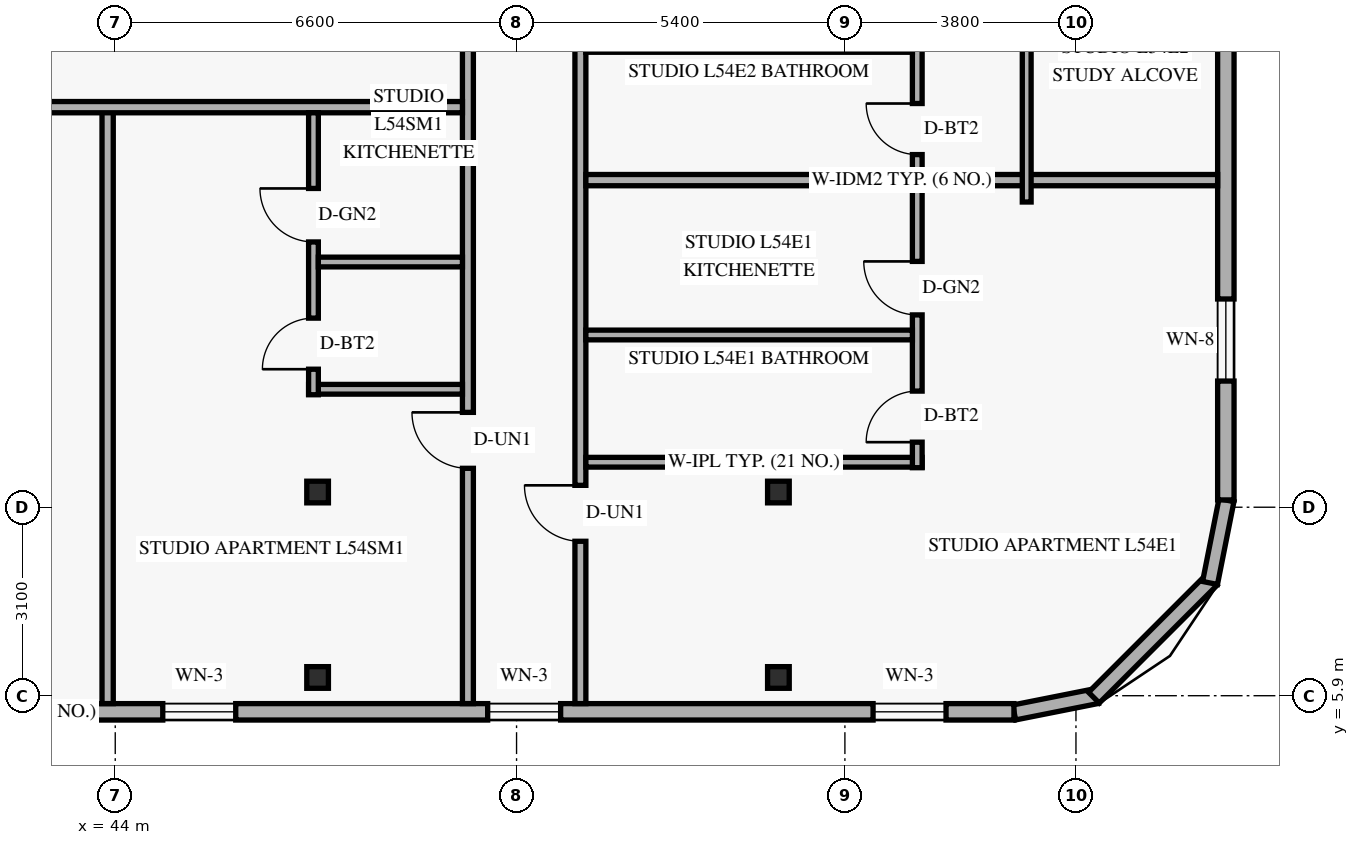
"""IFC4 building model, lengths in metres.
Left out: names, types, materials, properties, quantities, classifications, styles, units other than length and angle.
Written with IfcOpenShell. Run it as: python <this file> out.ifc"""

import sys

from ifc_helpers import new_model, si_unit, direction, frame, frame_2d, origin, origin_2d, place, context, subcontext, project, spatial, rectangle, hollow_rectangle, extrude, element, fill, save


model = new_model("IFC4")
c1 = context("Model", 3, precision=1e-05, world=origin(), true_north=direction((0.0, 1.0)))
c2 = subcontext(c1, "Body", "Model", "MODEL_VIEW")
j1 = project(units=[si_unit("LENGTHUNIT", "METRE"), si_unit("PLANEANGLEUNIT", "RADIAN")], contexts=[c1])
p1 = place(None, origin())
s1 = spatial("IfcSite", under=j1, at=p1, CompositionType="ELEMENT")
p2 = place(p1, origin())
s2 = spatial("IfcBuilding", under=s1, at=p2, CompositionType="ELEMENT")
p3 = place(p2, frame((0.0, 0.0, 209.4)))
s3 = spatial("IfcBuildingStorey", under=s2, at=p3, CompositionType="ELEMENT", Elevation=209.4)
for number, where, z_axis, x_axis in (
    (1, (47.265, 6.2, 0.0), (0.035, 0.0, 0.999), (0.0, 1.0, 0.0)),
    (2, (47.265, 9.25, 0.0), (0.035, 0.0, 0.999), (0.0, 1.0, 0.0)),
):
    element("IfcColumn", number, at=place(p3, frame(where, z_axis=z_axis, x_axis=x_axis)), inside=s3, PredefinedType="COLUMN", context=c2, shape_type="SweptSolid", body=[
        extrude(hollow_rectangle(XDim=0.356, YDim=0.356, WallThickness=0.016, at=origin_2d()), origin(), (0.0, 0.0, 1.0), 3.602),
    ])
for number, where, z_axis, x_axis in (
    (3, (54.802, 6.2, 0.0), (0.058, 0.0, 0.998), (0.0, 1.0, 0.0)),
    (4, (54.802, 9.25, 0.0), (0.058, 0.0, 0.998), (0.0, 1.0, 0.0)),
):
    element("IfcColumn", number, at=place(p3, frame(where, z_axis=z_axis, x_axis=x_axis)), inside=s3, PredefinedType="COLUMN", context=c2, shape_type="SweptSolid", body=[
        extrude(hollow_rectangle(XDim=0.356, YDim=0.356, WallThickness=0.016, at=origin_2d()), origin(), (0.0, 0.0, 1.0), 3.606),
    ])
p4 = place(p3, frame((58.783, 5.624, 0.0), z_axis=(0.0, 0.0, 1.0), x_axis=(0.980809899341, 0.19496651342, 0.0)))
e5 = element("IfcWall", 5, at=p4, inside=s3, PredefinedType="SOLIDWALL", context=c2, shape_type="SweptSolid", body=[
    extrude(rectangle(XDim=1.389, YDim=0.25, at=frame_2d((0.694, 0.0))), origin(), (0.0, 0.0, 1.0), 3.36),
])
p5 = place(p3, frame((60.095, 5.868, 0.0), z_axis=(0.0, 0.0, 1.0), x_axis=(0.707106781187, 0.707106781187, 0.0)))
e6 = element("IfcWall", 6, at=p5, inside=s3, PredefinedType="SOLIDWALL", context=c2, shape_type="SweptSolid", body=[
    extrude(rectangle(XDim=2.739, YDim=0.25, at=frame_2d((1.37, 0.0))), origin(), (0.0, 0.0, 1.0), 3.36),
])
p6 = place(p3, frame((62.005, 7.754, 0.0), z_axis=(0.0, 0.0, 1.0), x_axis=(0.195135625965, 0.9807762678, 0.0)))
e7 = element("IfcWall", 7, at=p6, inside=s3, PredefinedType="SOLIDWALL", context=c2, shape_type="SweptSolid", body=[
    extrude(rectangle(XDim=1.389, YDim=0.25, at=frame_2d((0.694, 0.0))), origin(), (0.0, 0.0, 1.0), 3.36),
])
p7 = place(p3, frame((25.82, 5.635, 0.0), z_axis=(0.0, 0.0, 1.0), x_axis=(1.0, 0.0, 0.0)))
e8 = element("IfcWall", 8, at=p7, inside=s3, PredefinedType="SOLIDWALL", context=c2, shape_type="SweptSolid", body=[
    extrude(rectangle(XDim=32.96, YDim=0.27, at=frame_2d((16.48, 0.0))), origin(), (0.0, 0.0, 1.0), 3.36),
])
p8 = place(p7, frame((3.87, 0.0, 0.85)))
e9 = element("IfcOpeningElement", 9, at=p8, cuts=e8, PredefinedType="OPENING", context=c2, shape_type="SweptSolid", body=[
    extrude(rectangle(XDim=1.2, YDim=1.5, at=frame_2d((0.6, 0.75))), frame((0.0, 0.145, 0.0), z_axis=(0.0, -1.0, 0.0), x_axis=(1.0, 0.0, 0.0)), (0.0, 0.0, 1.0), 0.29),
])
p9 = place(p7, frame((18.961, 0.0, 0.85)))
e10 = element("IfcOpeningElement", 10, at=p9, cuts=e8, PredefinedType="OPENING", context=c2, shape_type="SweptSolid", body=[
    extrude(rectangle(XDim=1.2, YDim=1.5, at=frame_2d((0.6, 0.75))), frame((0.0, 0.145, 0.0), z_axis=(0.0, -1.0, 0.0), x_axis=(1.0, 0.0, 0.0)), (0.0, 0.0, 1.0), 0.29),
])
p10 = place(p7, frame((24.305, 0.0, 0.85)))
e11 = element("IfcOpeningElement", 11, at=p10, cuts=e8, PredefinedType="OPENING", context=c2, shape_type="SweptSolid", body=[
    extrude(rectangle(XDim=1.2, YDim=1.5, at=frame_2d((0.6, 0.75))), frame((0.0, 0.145, 0.0), z_axis=(0.0, -1.0, 0.0), x_axis=(1.0, 0.0, 0.0)), (0.0, 0.0, 1.0), 0.29),
])
p11 = place(p7, frame((30.643, 0.0, 0.85)))
e12 = element("IfcOpeningElement", 12, at=p11, cuts=e8, PredefinedType="OPENING", context=c2, shape_type="SweptSolid", body=[
    extrude(rectangle(XDim=1.2, YDim=1.5, at=frame_2d((0.6, 0.75))), frame((0.0, 0.145, 0.0), z_axis=(0.0, -1.0, 0.0), x_axis=(1.0, 0.0, 0.0)), (0.0, 0.0, 1.0), 0.29),
])
p12 = place(p3, frame((62.265, 9.12, 0.0), z_axis=(0.0, 0.0, 1.0), x_axis=(0.0, 1.0, 0.0)))
e13 = element("IfcWall", 13, at=p12, inside=s3, PredefinedType="SOLIDWALL", context=c2, shape_type="SweptSolid", body=[
    extrude(rectangle(XDim=29.76, YDim=0.27, at=frame_2d((14.88, 0.0))), origin(), (0.0, 0.0, 1.0), 3.36),
])
p13 = place(p12, frame((1.955, 0.0, 0.85)))
e14 = element("IfcOpeningElement", 14, at=p13, cuts=e13, PredefinedType="OPENING", context=c2, shape_type="SweptSolid", body=[
    extrude(rectangle(XDim=1.35, YDim=1.55, at=frame_2d((0.675, 0.775))), frame((0.0, 0.145, 0.0), z_axis=(0.0, -1.0, 0.0), x_axis=(1.0, 0.0, 0.0)), (0.0, 0.0, 1.0), 0.29),
])
p14 = place(p12, frame((7.53, 0.0, 0.85)))
e15 = element("IfcOpeningElement", 15, at=p14, cuts=e13, PredefinedType="OPENING", context=c2, shape_type="SweptSolid", body=[
    extrude(rectangle(XDim=1.35, YDim=1.55, at=frame_2d((0.675, 0.775))), frame((0.0, 0.145, 0.0), z_axis=(0.0, -1.0, 0.0), x_axis=(1.0, 0.0, 0.0)), (0.0, 0.0, 1.0), 0.29),
])
p15 = place(p12, frame((12.34, 0.0, 0.85)))
e16 = element("IfcOpeningElement", 16, at=p15, cuts=e13, PredefinedType="OPENING", context=c2, shape_type="SweptSolid", body=[
    extrude(rectangle(XDim=1.35, YDim=1.55, at=frame_2d((0.675, 0.775))), frame((0.0, 0.145, 0.0), z_axis=(0.0, -1.0, 0.0), x_axis=(1.0, 0.0, 0.0)), (0.0, 0.0, 1.0), 0.29),
])
p16 = place(p12, frame((17.412, 0.0, 0.85)))
e17 = element("IfcOpeningElement", 17, at=p16, cuts=e13, PredefinedType="OPENING", context=c2, shape_type="SweptSolid", body=[
    extrude(rectangle(XDim=1.35, YDim=1.55, at=frame_2d((0.675, 0.775))), frame((0.0, 0.145, 0.0), z_axis=(0.0, -1.0, 0.0), x_axis=(1.0, 0.0, 0.0)), (0.0, 0.0, 1.0), 0.29),
])
p17 = place(p12, frame((22.222, 0.0, 0.85)))
e18 = element("IfcOpeningElement", 18, at=p17, cuts=e13, PredefinedType="OPENING", context=c2, shape_type="SweptSolid", body=[
    extrude(rectangle(XDim=1.35, YDim=1.55, at=frame_2d((0.675, 0.775))), frame((0.0, 0.145, 0.0), z_axis=(0.0, -1.0, 0.0), x_axis=(1.0, 0.0, 0.0)), (0.0, 0.0, 1.0), 0.29),
])
p18 = place(p12, frame((26.455, 0.0, 0.85)))
e19 = element("IfcOpeningElement", 19, at=p18, cuts=e13, PredefinedType="OPENING", context=c2, shape_type="SweptSolid", body=[
    extrude(rectangle(XDim=1.35, YDim=1.55, at=frame_2d((0.675, 0.775))), frame((0.0, 0.145, 0.0), z_axis=(0.0, -1.0, 0.0), x_axis=(1.0, 0.0, 0.0)), (0.0, 0.0, 1.0), 0.29),
])
p19 = place(p3, frame((49.8, 5.77, 0.0), z_axis=(0.0, 0.0, 1.0), x_axis=(0.0, 1.0, 0.0)))
e20 = element("IfcWall", 20, at=p19, inside=s3, PredefinedType="STANDARD", context=c2, shape_type="SweptSolid", body=[
    extrude(rectangle(XDim=12.83, YDim=0.18, at=frame_2d((6.415, 0.0))), origin(), (0.0, 0.0, 1.0), 2.803),
])
p20 = place(p19, frame((3.87, 0.0, 0.0)))
e21 = element("IfcOpeningElement", 21, at=p20, cuts=e20, PredefinedType="OPENING", context=c2, shape_type="SweptSolid", body=[
    extrude(rectangle(XDim=0.92, YDim=2.15, at=frame_2d((0.46, 1.075))), frame((0.0, 0.1, 0.0), z_axis=(0.0, -1.0, 0.0), x_axis=(1.0, 0.0, 0.0)), (0.0, 0.0, 1.0), 0.2),
])
p21 = place(p3, frame((51.65, 5.77, 0.0), z_axis=(0.0, 0.0, 1.0), x_axis=(0.0, 1.0, 0.0)))
e22 = element("IfcWall", 22, at=p21, inside=s3, PredefinedType="STANDARD", context=c2, shape_type="SweptSolid", body=[
    extrude(rectangle(XDim=36.46, YDim=0.18, at=frame_2d((18.23, 0.0))), origin(), (0.0, 0.0, 1.0), 2.803),
])
p22 = place(p21, frame((2.67, 0.0, 0.0)))
e23 = element("IfcOpeningElement", 23, at=p22, cuts=e22, PredefinedType="OPENING", context=c2, shape_type="SweptSolid", body=[
    extrude(rectangle(XDim=0.92, YDim=2.15, at=frame_2d((0.46, 1.075))), frame((0.0, 0.1, 0.0), z_axis=(0.0, -1.0, 0.0), x_axis=(1.0, 0.0, 0.0)), (0.0, 0.0, 1.0), 0.2),
])
p23 = place(p21, frame((13.61, 0.0, 0.0)))
e24 = element("IfcOpeningElement", 24, at=p23, cuts=e22, PredefinedType="OPENING", context=c2, shape_type="SweptSolid", body=[
    extrude(rectangle(XDim=0.92, YDim=2.15, at=frame_2d((0.46, 1.075))), frame((0.0, 0.1, 0.0), z_axis=(0.0, -1.0, 0.0), x_axis=(1.0, 0.0, 0.0)), (0.0, 0.0, 1.0), 0.2),
])
p24 = place(p21, frame((18.76, 0.0, 0.0)))
e25 = element("IfcOpeningElement", 25, at=p24, cuts=e22, PredefinedType="OPENING", context=c2, shape_type="SweptSolid", body=[
    extrude(rectangle(XDim=0.92, YDim=2.15, at=frame_2d((0.46, 1.075))), frame((0.0, 0.1, 0.0), z_axis=(0.0, -1.0, 0.0), x_axis=(1.0, 0.0, 0.0)), (0.0, 0.0, 1.0), 0.2),
])
p25 = place(p21, frame((32.75, 0.0, 0.0)))
e26 = element("IfcOpeningElement", 26, at=p25, cuts=e22, PredefinedType="OPENING", context=c2, shape_type="SweptSolid", body=[
    extrude(rectangle(XDim=0.92, YDim=2.15, at=frame_2d((0.46, 1.075))), frame((0.0, 0.1, 0.0), z_axis=(0.0, -1.0, 0.0), x_axis=(1.0, 0.0, 0.0)), (0.0, 0.0, 1.0), 0.2),
])
p26 = place(p3, frame((51.74, 9.74, 0.0), z_axis=(0.0, 0.0, 1.0), x_axis=(1.0, 0.0, 0.0)))
e27 = element("IfcWall", 27, at=p26, inside=s3, PredefinedType="PLUMBINGWALL", context=c2, shape_type="SweptSolid", body=[
    extrude(rectangle(XDim=5.53, YDim=0.16, at=frame_2d((2.765, 0.0))), origin(), (0.0, 0.0, 1.0), 2.879),
])
p27 = place(p3, frame((57.19, 9.65, 0.0), z_axis=(0.0, 0.0, 1.0), x_axis=(0.0, 1.0, 0.0)))
e28 = element("IfcWall", 28, at=p27, inside=s3, PredefinedType="PLUMBINGWALL", context=c2, shape_type="SweptSolid", body=[
    extrude(rectangle(XDim=4.73, YDim=0.16, at=frame_2d((2.365, 0.0))), origin(), (0.0, 0.0, 1.0), 3.36),
])
p28 = place(p27, frame((0.42, 0.0, 0.0)))
e29 = element("IfcOpeningElement", 29, at=p28, cuts=e28, PredefinedType="OPENING", context=c2, shape_type="SweptSolid", body=[
    extrude(rectangle(XDim=0.84, YDim=2.12, at=frame_2d((0.42, 1.06))), frame((0.0, 0.09, 0.0), z_axis=(0.0, -1.0, 0.0), x_axis=(1.0, 0.0, 0.0)), (0.0, 0.0, 1.0), 0.18),
])
p29 = place(p27, frame((2.513, 0.0, 0.0)))
e30 = element("IfcOpeningElement", 30, at=p29, cuts=e28, PredefinedType="OPENING", context=c2, shape_type="SweptSolid", body=[
    extrude(rectangle(XDim=0.88, YDim=2.12, at=frame_2d((0.44, 1.06))), frame((0.0, 0.09, 0.0), z_axis=(0.0, -1.0, 0.0), x_axis=(1.0, 0.0, 0.0)), (0.0, 0.0, 1.0), 0.18),
])
p30 = place(p3, frame((51.74, 11.833, 0.0), z_axis=(0.0, 0.0, 1.0), x_axis=(1.0, 0.0, 0.0)))
e31 = element("IfcWall", 31, at=p30, inside=s3, PredefinedType="PLUMBINGWALL", context=c2, shape_type="SweptSolid", body=[
    extrude(rectangle(XDim=5.37, YDim=0.16, at=frame_2d((2.685, 0.0))), origin(), (0.0, 0.0, 1.0), 2.879),
])
p31 = place(p3, frame((51.74, 14.38, 0.0), z_axis=(0.0, 0.0, 1.0), x_axis=(1.0, 0.0, 0.0)))
e32 = element("IfcWall", 32, at=p31, inside=s3, PredefinedType="PARTITIONING", context=c2, shape_type="SweptSolid", body=[
    extrude(rectangle(XDim=10.39, YDim=0.185, at=frame_2d((5.195, 0.0))), origin(), (0.0, 0.0, 1.0), 2.879),
])
p32 = place(p3, frame((57.19, 14.472, 0.0), z_axis=(0.0, 0.0, 1.0), x_axis=(0.0, 1.0, 0.0)))
e33 = element("IfcWall", 33, at=p32, inside=s3, PredefinedType="PLUMBINGWALL", context=c2, shape_type="SweptSolid", body=[
    extrude(rectangle(XDim=4.638, YDim=0.16, at=frame_2d((2.319, 0.0))), origin(), (0.0, 0.0, 1.0), 3.36),
])
p33 = place(p32, frame((0.327, 0.0, 0.0)))
e34 = element("IfcOpeningElement", 34, at=p33, cuts=e33, PredefinedType="OPENING", context=c2, shape_type="SweptSolid", body=[
    extrude(rectangle(XDim=0.84, YDim=2.12, at=frame_2d((0.42, 1.06))), frame((0.0, 0.09, 0.0), z_axis=(0.0, -1.0, 0.0), x_axis=(1.0, 0.0, 0.0)), (0.0, 0.0, 1.0), 0.18),
])
p34 = place(p32, frame((2.42, 0.0, 0.0)))
e35 = element("IfcOpeningElement", 35, at=p34, cuts=e33, PredefinedType="OPENING", context=c2, shape_type="SweptSolid", body=[
    extrude(rectangle(XDim=0.88, YDim=2.12, at=frame_2d((0.44, 1.06))), frame((0.0, 0.09, 0.0), z_axis=(0.0, -1.0, 0.0), x_axis=(1.0, 0.0, 0.0)), (0.0, 0.0, 1.0), 0.18),
])
p35 = place(p3, frame((51.74, 16.563, 0.0), z_axis=(0.0, 0.0, 1.0), x_axis=(1.0, 0.0, 0.0)))
e36 = element("IfcWall", 36, at=p35, inside=s3, PredefinedType="PLUMBINGWALL", context=c2, shape_type="SweptSolid", body=[
    extrude(rectangle(XDim=5.37, YDim=0.16, at=frame_2d((2.685, 0.0))), origin(), (0.0, 0.0, 1.0), 2.879),
])
p36 = place(p3, frame((58.99, 14.02, 0.0), z_axis=(0.0, 0.0, 1.0), x_axis=(0.0, 1.0, 0.0)))
e37 = element("IfcWall", 37, at=p36, inside=s3, PredefinedType="PARTITIONING", context=c2, shape_type="SweptSolid", body=[
    extrude(rectangle(XDim=6.25, YDim=0.145, at=frame_2d((3.125, 0.0))), origin(), (0.0, 0.0, 1.0), 3.36),
])
p37 = place(p3, frame((43.875, 5.77, 0.0), z_axis=(0.0, 0.0, 1.0), x_axis=(0.0, 1.0, 0.0)))
e38 = element("IfcWall", 38, at=p37, inside=s3, PredefinedType="PARTITIONING", context=c2, shape_type="SweptSolid", body=[
    extrude(rectangle(XDim=9.81, YDim=0.185, at=frame_2d((4.905, 0.0))), origin(), (0.0, 0.0, 1.0), 2.803),
])
p38 = place(p3, frame((38.022, 15.58, 0.0), z_axis=(0.0, 0.0, 1.0), x_axis=(1.0, 0.0, 0.0)))
e39 = element("IfcWall", 39, at=p38, inside=s3, PredefinedType="PARTITIONING", context=c2, shape_type="SweptSolid", body=[
    extrude(rectangle(XDim=11.688, YDim=0.185, at=frame_2d((5.844, 0.0))), origin(), (0.0, 0.0, 1.0), 2.803),
])
p39 = place(p3, frame((47.18, 10.94, 0.0), z_axis=(0.0, 0.0, 1.0), x_axis=(1.0, 0.0, 0.0)))
e40 = element("IfcWall", 40, at=p39, inside=s3, PredefinedType="PLUMBINGWALL", context=c2, shape_type="SweptSolid", body=[
    extrude(rectangle(XDim=2.53, YDim=0.16, at=frame_2d((1.265, 0.0))), origin(), (0.0, 0.0, 1.0), 2.803),
])
p40 = place(p3, frame((47.26, 10.85, 0.0), z_axis=(0.0, 0.0, 1.0), x_axis=(0.0, 1.0, 0.0)))
e41 = element("IfcWall", 41, at=p40, inside=s3, PredefinedType="PLUMBINGWALL", context=c2, shape_type="SweptSolid", body=[
    extrude(rectangle(XDim=4.637, YDim=0.16, at=frame_2d((2.319, 0.0))), origin(), (0.0, 0.0, 1.0), 2.803),
])
p41 = place(p40, frame((0.42, 0.0, 0.0)))
e42 = element("IfcOpeningElement", 42, at=p41, cuts=e41, PredefinedType="OPENING", context=c2, shape_type="SweptSolid", body=[
    extrude(rectangle(XDim=0.84, YDim=2.12, at=frame_2d((0.42, 1.06))), frame((0.0, 0.09, 0.0), z_axis=(0.0, -1.0, 0.0), x_axis=(1.0, 0.0, 0.0)), (0.0, 0.0, 1.0), 0.18),
])
p42 = place(p40, frame((2.513, 0.0, 0.0)))
e43 = element("IfcOpeningElement", 43, at=p42, cuts=e41, PredefinedType="OPENING", context=c2, shape_type="SweptSolid", body=[
    extrude(rectangle(XDim=0.88, YDim=2.12, at=frame_2d((0.44, 1.06))), frame((0.0, 0.09, 0.0), z_axis=(0.0, -1.0, 0.0), x_axis=(1.0, 0.0, 0.0)), (0.0, 0.0, 1.0), 0.18),
])
p43 = place(p3, frame((47.34, 13.033, 0.0), z_axis=(0.0, 0.0, 1.0), x_axis=(1.0, 0.0, 0.0)))
e44 = element("IfcWall", 44, at=p43, inside=s3, PredefinedType="PLUMBINGWALL", context=c2, shape_type="SweptSolid", body=[
    extrude(rectangle(XDim=2.37, YDim=0.16, at=frame_2d((1.185, 0.0))), origin(), (0.0, 0.0, 1.0), 2.803),
])
p44 = place(p9, origin())
e45 = element("IfcWindow", 45, at=p44, inside=s3, PartitioningType="SINGLE_PANEL", PredefinedType="WINDOW", context=c2, shape_type="SweptSolid", body=[
    extrude(rectangle(XDim=1.2, YDim=1.5, at=frame_2d((0.6, 0.75))), frame((0.0, 0.03, 0.0), z_axis=(0.0, -1.0, 0.0), x_axis=(1.0, 0.0, 0.0)), (0.0, 0.0, 1.0), 0.06),
])
fill(e10, e45)
p45 = place(p10, origin())
e46 = element("IfcWindow", 46, at=p45, inside=s3, PartitioningType="SINGLE_PANEL", PredefinedType="WINDOW", context=c2, shape_type="SweptSolid", body=[
    extrude(rectangle(XDim=1.2, YDim=1.5, at=frame_2d((0.6, 0.75))), frame((0.0, 0.03, 0.0), z_axis=(0.0, -1.0, 0.0), x_axis=(1.0, 0.0, 0.0)), (0.0, 0.0, 1.0), 0.06),
])
fill(e11, e46)
p46 = place(p11, origin())
e47 = element("IfcWindow", 47, at=p46, inside=s3, PartitioningType="SINGLE_PANEL", PredefinedType="WINDOW", context=c2, shape_type="SweptSolid", body=[
    extrude(rectangle(XDim=1.2, YDim=1.5, at=frame_2d((0.6, 0.75))), frame((0.0, 0.03, 0.0), z_axis=(0.0, -1.0, 0.0), x_axis=(1.0, 0.0, 0.0)), (0.0, 0.0, 1.0), 0.06),
])
fill(e12, e47)
p47 = place(p13, origin())
e48 = element("IfcWindow", 48, at=p47, inside=s3, PartitioningType="SINGLE_PANEL", PredefinedType="WINDOW", context=c2, shape_type="SweptSolid", body=[
    extrude(rectangle(XDim=1.35, YDim=1.55, at=frame_2d((0.675, 0.775))), frame((0.0, 0.03, 0.0), z_axis=(0.0, -1.0, 0.0), x_axis=(1.0, 0.0, 0.0)), (0.0, 0.0, 1.0), 0.06),
])
fill(e14, e48)
p48 = place(p22, origin())
e49 = element("IfcDoor", 49, at=p48, inside=s3, OperationType="SINGLE_SWING_RIGHT", PredefinedType="DOOR", context=c2, shape_type="SweptSolid", body=[
    extrude(rectangle(XDim=0.92, YDim=2.15, at=frame_2d((0.46, 1.075))), frame((0.0, 0.025, 0.0), z_axis=(0.0, -1.0, 0.0), x_axis=(1.0, 0.0, 0.0)), (0.0, 0.0, 1.0), 0.05),
])
fill(e23, e49)
p49 = place(p28, origin())
e50 = element("IfcDoor", 50, at=p49, inside=s3, OperationType="SINGLE_SWING_LEFT", PredefinedType="DOOR", context=c2, shape_type="SweptSolid", body=[
    extrude(rectangle(XDim=0.84, YDim=2.12, at=frame_2d((0.42, 1.06))), frame((0.0, 0.025, 0.0), z_axis=(0.0, -1.0, 0.0), x_axis=(1.0, 0.0, 0.0)), (0.0, 0.0, 1.0), 0.05),
])
fill(e29, e50)
p50 = place(p29, origin())
e51 = element("IfcDoor", 51, at=p50, inside=s3, OperationType="SINGLE_SWING_RIGHT", PredefinedType="DOOR", context=c2, shape_type="SweptSolid", body=[
    extrude(rectangle(XDim=0.88, YDim=2.12, at=frame_2d((0.44, 1.06))), frame((0.0, 0.025, 0.0), z_axis=(0.0, -1.0, 0.0), x_axis=(1.0, 0.0, 0.0)), (0.0, 0.0, 1.0), 0.05),
])
fill(e30, e51)
p51 = place(p33, origin())
e52 = element("IfcDoor", 52, at=p51, inside=s3, OperationType="SINGLE_SWING_RIGHT", PredefinedType="DOOR", context=c2, shape_type="SweptSolid", body=[
    extrude(rectangle(XDim=0.84, YDim=2.12, at=frame_2d((0.42, 1.06))), frame((0.0, 0.025, 0.0), z_axis=(0.0, -1.0, 0.0), x_axis=(1.0, 0.0, 0.0)), (0.0, 0.0, 1.0), 0.05),
])
fill(e34, e52)
p52 = place(p20, origin())
e53 = element("IfcDoor", 53, at=p52, inside=s3, OperationType="SINGLE_SWING_RIGHT", PredefinedType="DOOR", context=c2, shape_type="SweptSolid", body=[
    extrude(rectangle(XDim=0.92, YDim=2.15, at=frame_2d((0.46, 1.075))), frame((0.0, 0.025, 0.0), z_axis=(0.0, -1.0, 0.0), x_axis=(1.0, 0.0, 0.0)), (0.0, 0.0, 1.0), 0.05),
])
fill(e21, e53)
p53 = place(p41, origin())
e54 = element("IfcDoor", 54, at=p53, inside=s3, OperationType="SINGLE_SWING_LEFT", PredefinedType="DOOR", context=c2, shape_type="SweptSolid", body=[
    extrude(rectangle(XDim=0.84, YDim=2.12, at=frame_2d((0.42, 1.06))), frame((0.0, 0.025, 0.0), z_axis=(0.0, -1.0, 0.0), x_axis=(1.0, 0.0, 0.0)), (0.0, 0.0, 1.0), 0.05),
])
fill(e42, e54)
p54 = place(p42, origin())
e55 = element("IfcDoor", 55, at=p54, inside=s3, OperationType="SINGLE_SWING_RIGHT", PredefinedType="DOOR", context=c2, shape_type="SweptSolid", body=[
    extrude(rectangle(XDim=0.88, YDim=2.12, at=frame_2d((0.44, 1.06))), frame((0.0, 0.025, 0.0), z_axis=(0.0, -1.0, 0.0), x_axis=(1.0, 0.0, 0.0)), (0.0, 0.0, 1.0), 0.05),
])
fill(e43, e55)
save(model, sys.argv[1])
